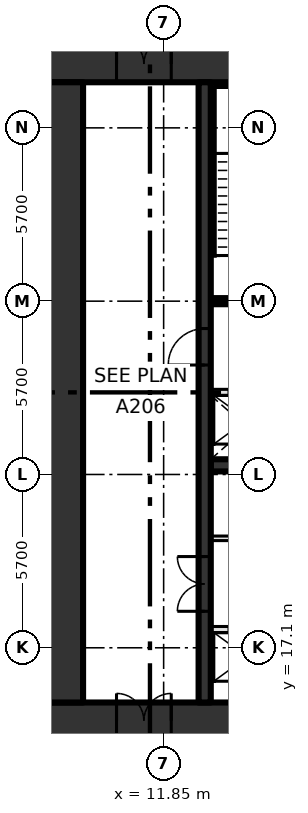
"""IFC4 building model, lengths in metres.
Left out: names, types, materials, properties, quantities, classifications, styles, units other than length and angle.
Written with IfcOpenShell. Run it as: python <this file> out.ifc"""

import sys

from ifc_helpers import new_model, si_unit, direction, frame, frame_2d, origin, place, context, subcontext, project, spatial, rectangle, extrude, element, fill, save


model = new_model("IFC4")
c1 = context("Model", 3, precision=1e-05, world=origin(), true_north=direction((0.0, 1.0)))
c2 = subcontext(c1, "Body", "Model", "MODEL_VIEW")
j1 = project(units=[si_unit("LENGTHUNIT", "METRE"), si_unit("PLANEANGLEUNIT", "RADIAN")], contexts=[c1])
p1 = place(None, origin())
s1 = spatial("IfcSite", under=j1, at=p1, CompositionType="ELEMENT")
p2 = place(p1, origin())
s2 = spatial("IfcBuilding", under=s1, at=p2, CompositionType="ELEMENT")
p3 = place(p2, frame((0.0, 0.0, 18.6)))
s3 = spatial("IfcBuildingStorey", under=s2, at=p3, CompositionType="ELEMENT", Elevation=18.6)
p4 = place(p3, frame((8.0, 14.7, -0.45), z_axis=(0.0, 0.0, 1.0), x_axis=(1.0, 0.0, 0.0)))
e1 = element("IfcWall", 1, at=p4, inside=s3, PredefinedType="SHEAR", context=c2, shape_type="SweptSolid", body=[
    extrude(rectangle(XDim=22.8, YDim=1.2, at=frame_2d((11.4, 0.0))), origin(), (0.0, 0.0, 1.0), 4.8),
])
p5 = place(p4, frame((2.3, 0.0, 0.45)))
e2 = element("IfcOpeningElement", 2, at=p5, cuts=e1, PredefinedType="OPENING", context=c2, shape_type="SweptSolid", body=[
    extrude(rectangle(XDim=1.8, YDim=2.1, at=frame_2d((0.9, 1.05))), frame((0.0, 0.61, 0.0), z_axis=(0.0, -1.0, 0.0), x_axis=(1.0, 0.0, 0.0)), (0.0, 0.0, 1.0), 1.22),
])
p6 = place(p3, frame((8.0, 36.3, -0.45), z_axis=(0.0, 0.0, 1.0), x_axis=(1.0, 0.0, 0.0)))
e3 = element("IfcWall", 3, at=p6, inside=s3, PredefinedType="SHEAR", context=c2, shape_type="SweptSolid", body=[
    extrude(rectangle(XDim=22.8, YDim=1.2, at=frame_2d((11.4, 0.0))), origin(), (0.0, 0.0, 1.0), 4.8),
])
p7 = place(p6, frame((2.3, 0.0, 0.45)))
e4 = element("IfcOpeningElement", 4, at=p7, cuts=e3, PredefinedType="OPENING", context=c2, shape_type="SweptSolid", body=[
    extrude(rectangle(XDim=1.8, YDim=2.1, at=frame_2d((0.9, 1.05))), frame((0.0, 0.61, 0.0), z_axis=(0.0, -1.0, 0.0), x_axis=(1.0, 0.0, 0.0)), (0.0, 0.0, 1.0), 1.22),
])
p8 = place(p3, frame((8.6, 15.3, -0.45), z_axis=(0.0, 0.0, 1.0), x_axis=(0.0, 1.0, 0.0)))
e5 = element("IfcWall", 5, at=p8, inside=s3, PredefinedType="SHEAR", context=c2, shape_type="SweptSolid", body=[
    extrude(rectangle(XDim=20.4, YDim=1.2, at=frame_2d((10.2, 0.0))), origin(), (0.0, 0.0, 1.0), 4.8),
])
p9 = place(p3, frame((13.4, 17.7, 0.0), z_axis=(0.0, 0.0, 1.0), x_axis=(1.0, 0.0, 0.0)))
e6 = element("IfcWall", 6, at=p9, inside=s3, PredefinedType="SOLIDWALL", context=c2, shape_type="SweptSolid", body=[
    extrude(rectangle(XDim=13.4, YDim=0.2, at=frame_2d((6.7, 0.0))), origin(), (0.0, 0.0, 1.0), 4.35),
])
p10 = place(p9, frame((0.6, 0.0, 0.0)))
e7 = element("IfcOpeningElement", 7, at=p10, cuts=e6, PredefinedType="OPENING", context=c2, shape_type="SweptSolid", body=[
    extrude(rectangle(XDim=1.1, YDim=2.1, at=frame_2d((0.55, 1.05))), frame((0.0, 0.11, 0.0), z_axis=(0.0, -1.0, 0.0), x_axis=(1.0, 0.0, 0.0)), (0.0, 0.0, 1.0), 0.22),
])
p11 = place(p9, frame((3.3, 0.0, 0.0)))
e8 = element("IfcOpeningElement", 8, at=p11, cuts=e6, PredefinedType="OPENING", context=c2, shape_type="SweptSolid", body=[
    extrude(rectangle(XDim=1.1, YDim=2.1, at=frame_2d((0.55, 1.05))), frame((0.0, 0.11, 0.0), z_axis=(0.0, -1.0, 0.0), x_axis=(1.0, 0.0, 0.0)), (0.0, 0.0, 1.0), 0.22),
])
p12 = place(p9, frame((6.0, 0.0, 0.0)))
e9 = element("IfcOpeningElement", 9, at=p12, cuts=e6, PredefinedType="OPENING", context=c2, shape_type="SweptSolid", body=[
    extrude(rectangle(XDim=1.1, YDim=2.1, at=frame_2d((0.55, 1.05))), frame((0.0, 0.11, 0.0), z_axis=(0.0, -1.0, 0.0), x_axis=(1.0, 0.0, 0.0)), (0.0, 0.0, 1.0), 0.22),
])
p13 = place(p9, frame((8.7, 0.0, 0.0)))
e10 = element("IfcOpeningElement", 10, at=p13, cuts=e6, PredefinedType="OPENING", context=c2, shape_type="SweptSolid", body=[
    extrude(rectangle(XDim=1.1, YDim=2.1, at=frame_2d((0.55, 1.05))), frame((0.0, 0.11, 0.0), z_axis=(0.0, -1.0, 0.0), x_axis=(1.0, 0.0, 0.0)), (0.0, 0.0, 1.0), 0.22),
])
p14 = place(p9, frame((11.4, 0.0, 0.0)))
e11 = element("IfcOpeningElement", 11, at=p14, cuts=e6, PredefinedType="OPENING", context=c2, shape_type="SweptSolid", body=[
    extrude(rectangle(XDim=1.1, YDim=2.1, at=frame_2d((0.55, 1.05))), frame((0.0, 0.11, 0.0), z_axis=(0.0, -1.0, 0.0), x_axis=(1.0, 0.0, 0.0)), (0.0, 0.0, 1.0), 0.22),
])
p15 = place(p3, frame((13.4, 20.7, 0.0), z_axis=(0.0, 0.0, 1.0), x_axis=(1.0, 0.0, 0.0)))
e12 = element("IfcWall", 12, at=p15, inside=s3, PredefinedType="PARTITIONING", context=c2, shape_type="SweptSolid", body=[
    extrude(rectangle(XDim=13.4, YDim=0.15, at=frame_2d((6.7, 0.0))), origin(), (0.0, 0.0, 1.0), 4.35),
])
p16 = place(p15, frame((3.4, 0.0, 0.0)))
e13 = element("IfcOpeningElement", 13, at=p16, cuts=e12, PredefinedType="OPENING", context=c2, shape_type="SweptSolid", body=[
    extrude(rectangle(XDim=0.9, YDim=2.1, at=frame_2d((0.45, 1.05))), frame((0.0, 0.085, 0.0), z_axis=(0.0, -1.0, 0.0), x_axis=(1.0, 0.0, 0.0)), (0.0, 0.0, 1.0), 0.17),
])
p17 = place(p15, frame((10.15, 0.0, 0.0)))
e14 = element("IfcOpeningElement", 14, at=p17, cuts=e12, PredefinedType="OPENING", context=c2, shape_type="SweptSolid", body=[
    extrude(rectangle(XDim=0.9, YDim=2.1, at=frame_2d((0.45, 1.05))), frame((0.0, 0.085, 0.0), z_axis=(0.0, -1.0, 0.0), x_axis=(1.0, 0.0, 0.0)), (0.0, 0.0, 1.0), 0.17),
])
p18 = place(p3, frame((13.4, 23.1, 0.0), z_axis=(0.0, 0.0, 1.0), x_axis=(1.0, 0.0, 0.0)))
e15 = element("IfcWall", 15, at=p18, inside=s3, PredefinedType="SHEAR", context=c2, shape_type="SweptSolid", body=[
    extrude(rectangle(XDim=16.2, YDim=0.4, at=frame_2d((8.1, 0.0))), origin(), (0.0, 0.0, 1.0), 4.35),
])
p19 = place(p3, frame((13.4, 25.5, 0.0), z_axis=(0.0, 0.0, 1.0), x_axis=(1.0, 0.0, 0.0)))
e16 = element("IfcWall", 16, at=p19, inside=s3, PredefinedType="SOLIDWALL", context=c2, shape_type="SweptSolid", body=[
    extrude(rectangle(XDim=16.2, YDim=0.2, at=frame_2d((8.1, 0.0))), origin(), (0.0, 0.0, 1.0), 4.35),
])
p20 = place(p19, frame((0.6, 0.0, 0.0)))
e17 = element("IfcOpeningElement", 17, at=p20, cuts=e16, PredefinedType="OPENING", context=c2, shape_type="SweptSolid", body=[
    extrude(rectangle(XDim=1.1, YDim=2.1, at=frame_2d((0.55, 1.05))), frame((0.0, 0.11, 0.0), z_axis=(0.0, -1.0, 0.0), x_axis=(1.0, 0.0, 0.0)), (0.0, 0.0, 1.0), 0.22),
])
p21 = place(p19, frame((3.3, 0.0, 0.0)))
e18 = element("IfcOpeningElement", 18, at=p21, cuts=e16, PredefinedType="OPENING", context=c2, shape_type="SweptSolid", body=[
    extrude(rectangle(XDim=1.1, YDim=2.1, at=frame_2d((0.55, 1.05))), frame((0.0, 0.11, 0.0), z_axis=(0.0, -1.0, 0.0), x_axis=(1.0, 0.0, 0.0)), (0.0, 0.0, 1.0), 0.22),
])
p22 = place(p19, frame((6.0, 0.0, 0.0)))
e19 = element("IfcOpeningElement", 19, at=p22, cuts=e16, PredefinedType="OPENING", context=c2, shape_type="SweptSolid", body=[
    extrude(rectangle(XDim=1.1, YDim=2.1, at=frame_2d((0.55, 1.05))), frame((0.0, 0.11, 0.0), z_axis=(0.0, -1.0, 0.0), x_axis=(1.0, 0.0, 0.0)), (0.0, 0.0, 1.0), 0.22),
])
p23 = place(p19, frame((8.7, 0.0, 0.0)))
e20 = element("IfcOpeningElement", 20, at=p23, cuts=e16, PredefinedType="OPENING", context=c2, shape_type="SweptSolid", body=[
    extrude(rectangle(XDim=1.1, YDim=2.1, at=frame_2d((0.55, 1.05))), frame((0.0, 0.11, 0.0), z_axis=(0.0, -1.0, 0.0), x_axis=(1.0, 0.0, 0.0)), (0.0, 0.0, 1.0), 0.22),
])
p24 = place(p3, frame((13.4, 28.5, 0.0), z_axis=(0.0, 0.0, 1.0), x_axis=(1.0, 0.0, 0.0)))
e21 = element("IfcWall", 21, at=p24, inside=s3, PredefinedType="SOLIDWALL", context=c2, shape_type="SweptSolid", body=[
    extrude(rectangle(XDim=6.7, YDim=0.2, at=frame_2d((3.35, 0.0))), origin(), (0.0, 0.0, 1.0), 4.35),
])
p25 = place(p24, frame((0.9, 0.0, 0.0)))
e22 = element("IfcOpeningElement", 22, at=p25, cuts=e21, PredefinedType="OPENING", context=c2, shape_type="SweptSolid", body=[
    extrude(rectangle(XDim=1.2, YDim=2.1, at=frame_2d((0.6, 1.05))), frame((0.0, 0.11, 0.0), z_axis=(0.0, -1.0, 0.0), x_axis=(1.0, 0.0, 0.0)), (0.0, 0.0, 1.0), 0.22),
])
p26 = place(p24, frame((3.7, 0.0, 0.0)))
e23 = element("IfcOpeningElement", 23, at=p26, cuts=e21, PredefinedType="OPENING", context=c2, shape_type="SweptSolid", body=[
    extrude(rectangle(XDim=1.1, YDim=2.1, at=frame_2d((0.55, 1.05))), frame((0.0, 0.11, 0.0), z_axis=(0.0, -1.0, 0.0), x_axis=(1.0, 0.0, 0.0)), (0.0, 0.0, 1.0), 0.22),
])
p27 = place(p3, frame((13.2, 15.3, 0.0), z_axis=(0.0, 0.0, 1.0), x_axis=(0.0, 1.0, 0.0)))
e24 = element("IfcWall", 24, at=p27, inside=s3, PredefinedType="SHEAR", context=c2, shape_type="SweptSolid", body=[
    extrude(rectangle(XDim=20.4, YDim=0.4, at=frame_2d((10.2, 0.0))), origin(), (0.0, 0.0, 1.0), 4.35),
])
p28 = place(p27, frame((3.0, 0.0, 0.0)))
e25 = element("IfcOpeningElement", 25, at=p28, cuts=e24, PredefinedType="OPENING", context=c2, shape_type="SweptSolid", body=[
    extrude(rectangle(XDim=1.8, YDim=2.1, at=frame_2d((0.9, 1.05))), frame((0.0, 0.21, 0.0), z_axis=(0.0, -1.0, 0.0), x_axis=(1.0, 0.0, 0.0)), (0.0, 0.0, 1.0), 0.42),
])
p29 = place(p27, frame((11.1, 0.0, 0.0)))
e26 = element("IfcOpeningElement", 26, at=p29, cuts=e24, PredefinedType="OPENING", context=c2, shape_type="SweptSolid", body=[
    extrude(rectangle(XDim=1.2, YDim=2.1, at=frame_2d((0.6, 1.05))), frame((0.0, 0.21, 0.0), z_axis=(0.0, -1.0, 0.0), x_axis=(1.0, 0.0, 0.0)), (0.0, 0.0, 1.0), 0.42),
])
p30 = place(p28, origin())
e27 = element("IfcDoor", 27, at=p30, inside=s3, OperationType="DOUBLE_DOOR_SINGLE_SWING", PredefinedType="DOOR", context=c2, shape_type="SweptSolid", body=[
    extrude(rectangle(XDim=1.8, YDim=2.1, at=frame_2d((0.9, 1.05))), frame((0.0, 0.025, 0.0), z_axis=(0.0, -1.0, 0.0), x_axis=(1.0, 0.0, 0.0)), (0.0, 0.0, 1.0), 0.05),
])
fill(e25, e27)
p31 = place(p29, origin())
e28 = element("IfcDoor", 28, at=p31, inside=s3, OperationType="SINGLE_SWING_LEFT", PredefinedType="DOOR", context=c2, shape_type="SweptSolid", body=[
    extrude(rectangle(XDim=1.2, YDim=2.1, at=frame_2d((0.6, 1.05))), frame((0.0, 0.025, 0.0), z_axis=(0.0, -1.0, 0.0), x_axis=(1.0, 0.0, 0.0)), (0.0, 0.0, 1.0), 0.05),
])
fill(e26, e28)
p32 = place(p7, origin())
e29 = element("IfcDoor", 29, at=p32, inside=s3, OperationType="DOUBLE_DOOR_SINGLE_SWING", PredefinedType="DOOR", context=c2, shape_type="SweptSolid", body=[
    extrude(rectangle(XDim=1.8, YDim=2.1, at=frame_2d((0.9, 1.05))), frame((0.0, 0.025, 0.0), z_axis=(0.0, -1.0, 0.0), x_axis=(1.0, 0.0, 0.0)), (0.0, 0.0, 1.0), 0.05),
])
fill(e4, e29)
p33 = place(p5, origin())
e30 = element("IfcDoor", 30, at=p33, inside=s3, OperationType="DOUBLE_DOOR_SINGLE_SWING", PredefinedType="DOOR", context=c2, shape_type="SweptSolid", body=[
    extrude(rectangle(XDim=1.8, YDim=2.1, at=frame_2d((0.9, 1.05))), frame((0.0, 0.025, 0.0), z_axis=(0.0, -1.0, 0.0), x_axis=(1.0, 0.0, 0.0)), (0.0, 0.0, 1.0), 0.05),
])
fill(e2, e30)
save(model, sys.argv[1])
